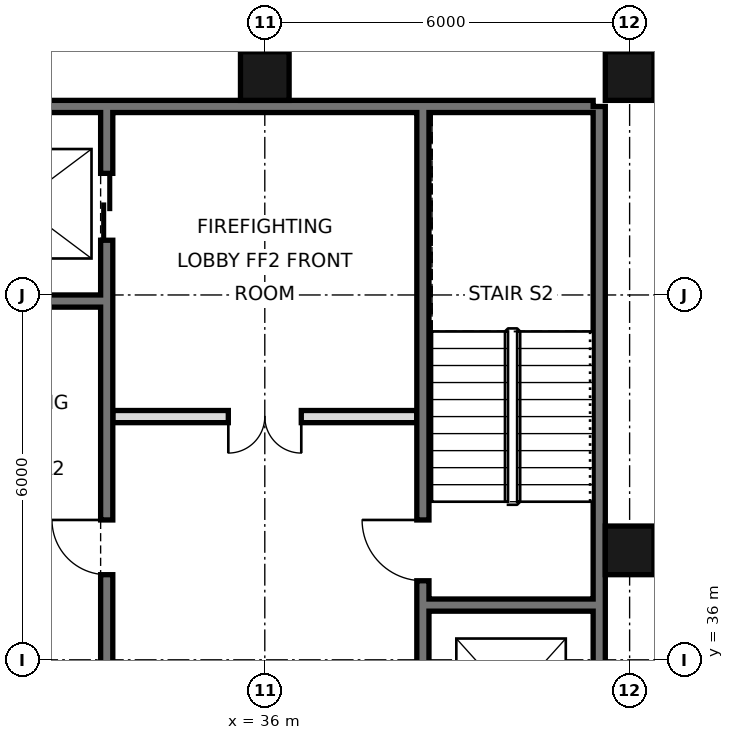
"""IFC4 building model, lengths in metres.
Left out: names, types, materials, properties, quantities, classifications, styles, units other than length and angle.
Written with IfcOpenShell. Run it as: python <this file> out.ifc"""

import sys

from ifc_helpers import new_model, si_unit, direction, frame, frame_2d, origin, origin_2d, place, context, subcontext, project, spatial, rectangle, hollow_rectangle, extrude, element, fill, save


model = new_model("IFC4")
c1 = context("Model", 3, precision=1e-05, world=origin(), true_north=direction((0.0, 1.0)))
c2 = subcontext(c1, "Body", "Model", "MODEL_VIEW")
j1 = project(units=[si_unit("LENGTHUNIT", "METRE"), si_unit("PLANEANGLEUNIT", "RADIAN")], contexts=[c1])
p1 = place(None, origin())
s1 = spatial("IfcSite", under=j1, at=p1, CompositionType="ELEMENT")
p2 = place(p1, origin())
s2 = spatial("IfcBuilding", under=s1, at=p2, CompositionType="ELEMENT")
p3 = place(p2, frame((0.0, 0.0, 273.8)))
s3 = spatial("IfcBuildingStorey", under=s2, at=p3, CompositionType="ELEMENT", Elevation=273.8)
for number, where, z_axis, x_axis in (
    (1, (36.0, 45.6, 0.0), (0.0, 0.0, 1.0), (1.0, 0.0, 0.0)),
    (2, (42.0, 37.8, 0.0), (0.0, 0.0, 1.0), (1.0, 0.0, 0.0)),
    (3, (42.0, 45.6, 0.0), (0.0, 0.0, 1.0), (1.0, 0.0, 0.0)),
):
    element("IfcColumn", number, at=place(p3, frame(where, z_axis=z_axis, x_axis=x_axis)), inside=s3, PredefinedType="COLUMN", context=c2, shape_type="SweptSolid", body=[
        extrude(hollow_rectangle(XDim=0.8, YDim=0.8, WallThickness=0.032, at=origin_2d()), origin(), (0.0, 0.0, 1.0), 3.6),
    ])
p4 = place(p3, frame((41.5, 21.6, 0.0), z_axis=(0.0, 0.0, 1.0), x_axis=(0.0, 1.0, 0.0)))
e4 = element("IfcWall", 4, at=p4, inside=s3, PredefinedType="SOLIDWALL", context=c2, shape_type="SweptSolid", body=[
    extrude(rectangle(XDim=23.5, YDim=0.2, at=frame_2d((11.75, 0.0))), origin(), (0.0, 0.0, 1.0), 3.42),
])
p5 = place(p3, frame((6.6, 45.1, 0.0), z_axis=(0.0, 0.0, 1.0), x_axis=(1.0, 0.0, 0.0)))
e5 = element("IfcWall", 5, at=p5, inside=s3, PredefinedType="SOLIDWALL", context=c2, shape_type="SweptSolid", body=[
    extrude(rectangle(XDim=34.8, YDim=0.2, at=frame_2d((17.4, 0.0))), origin(), (0.0, 0.0, 1.0), 3.42),
])
p6 = place(p3, frame((33.4, 27.5, 0.0), z_axis=(0.0, 0.0, 1.0), x_axis=(0.0, 1.0, 0.0)))
e6 = element("IfcWall", 6, at=p6, inside=s3, PredefinedType="SOLIDWALL", context=c2, shape_type="SweptSolid", body=[
    extrude(rectangle(XDim=17.5, YDim=0.2, at=frame_2d((8.75, 0.0))), origin(), (0.0, 0.0, 1.0), 3.42),
])
p7 = place(p6, frame((1.1, 0.0, 0.0)))
e7 = element("IfcOpeningElement", 7, at=p7, cuts=e6, PredefinedType="OPENING", context=c2, shape_type="SweptSolid", body=[
    extrude(rectangle(XDim=1.1, YDim=2.1, at=frame_2d((0.55, 1.05))), frame((0.0, 0.11, 0.0), z_axis=(0.0, -1.0, 0.0), x_axis=(1.0, 0.0, 0.0)), (0.0, 0.0, 1.0), 0.22),
])
p8 = place(p6, frame((4.2, 0.0, 0.0)))
e8 = element("IfcOpeningElement", 8, at=p8, cuts=e6, PredefinedType="OPENING", context=c2, shape_type="SweptSolid", body=[
    extrude(rectangle(XDim=1.1, YDim=2.1, at=frame_2d((0.55, 1.05))), frame((0.0, 0.11, 0.0), z_axis=(0.0, -1.0, 0.0), x_axis=(1.0, 0.0, 0.0)), (0.0, 0.0, 1.0), 0.22),
])
p9 = place(p6, frame((15.4, 0.0, 0.0)))
e9 = element("IfcOpeningElement", 9, at=p9, cuts=e6, PredefinedType="OPENING", context=c2, shape_type="SweptSolid", body=[
    extrude(rectangle(XDim=1.1, YDim=2.1, at=frame_2d((0.55, 1.05))), frame((0.0, 0.11, 0.0), z_axis=(0.0, -1.0, 0.0), x_axis=(1.0, 0.0, 0.0)), (0.0, 0.0, 1.0), 0.22),
])
p10 = place(p6, frame((9.9, 0.0, 0.0)))
e10 = element("IfcOpeningElement", 10, at=p10, cuts=e6, PredefinedType="OPENING", context=c2, shape_type="SweptSolid", body=[
    extrude(rectangle(XDim=0.9, YDim=2.1, at=frame_2d((0.45, 1.05))), frame((0.0, 0.11, 0.0), z_axis=(0.0, -1.0, 0.0), x_axis=(1.0, 0.0, 0.0)), (0.0, 0.0, 1.0), 0.22),
])
p11 = place(p3, frame((38.6, 21.6, 0.0), z_axis=(0.0, 0.0, 1.0), x_axis=(0.0, 1.0, 0.0)))
e11 = element("IfcWall", 11, at=p11, inside=s3, PredefinedType="SOLIDWALL", context=c2, shape_type="SweptSolid", body=[
    extrude(rectangle(XDim=23.4, YDim=0.2, at=frame_2d((11.7, 0.0))), origin(), (0.0, 0.0, 1.0), 3.42),
])
p12 = place(p11, frame((7.0, 0.0, 0.0)))
e12 = element("IfcOpeningElement", 12, at=p12, cuts=e11, PredefinedType="OPENING", context=c2, shape_type="SweptSolid", body=[
    extrude(rectangle(XDim=1.1, YDim=2.1, at=frame_2d((0.55, 1.05))), frame((0.0, 0.11, 0.0), z_axis=(0.0, -1.0, 0.0), x_axis=(1.0, 0.0, 0.0)), (0.0, 0.0, 1.0), 0.22),
])
p13 = place(p11, frame((10.1, 0.0, 0.0)))
e13 = element("IfcOpeningElement", 13, at=p13, cuts=e11, PredefinedType="OPENING", context=c2, shape_type="SweptSolid", body=[
    extrude(rectangle(XDim=1.1, YDim=2.1, at=frame_2d((0.55, 1.05))), frame((0.0, 0.11, 0.0), z_axis=(0.0, -1.0, 0.0), x_axis=(1.0, 0.0, 0.0)), (0.0, 0.0, 1.0), 0.22),
])
p14 = place(p11, frame((13.2, 0.0, 0.0)))
e14 = element("IfcOpeningElement", 14, at=p14, cuts=e11, PredefinedType="OPENING", context=c2, shape_type="SweptSolid", body=[
    extrude(rectangle(XDim=1.1, YDim=2.1, at=frame_2d((0.55, 1.05))), frame((0.0, 0.11, 0.0), z_axis=(0.0, -1.0, 0.0), x_axis=(1.0, 0.0, 0.0)), (0.0, 0.0, 1.0), 0.22),
])
p15 = place(p11, frame((15.7, 0.0, 0.0)))
e15 = element("IfcOpeningElement", 15, at=p15, cuts=e11, PredefinedType="OPENING", context=c2, shape_type="SweptSolid", body=[
    extrude(rectangle(XDim=1.0, YDim=2.1, at=frame_2d((0.5, 1.05))), frame((0.0, 0.11, 0.0), z_axis=(0.0, -1.0, 0.0), x_axis=(1.0, 0.0, 0.0)), (0.0, 0.0, 1.0), 0.22),
])
p16 = place(p11, frame((0.175, 0.0, 0.0)))
e16 = element("IfcOpeningElement", 16, at=p16, cuts=e11, PredefinedType="OPENING", context=c2, shape_type="SweptSolid", body=[
    extrude(rectangle(XDim=0.9, YDim=2.1, at=frame_2d((0.45, 1.05))), frame((0.0, 0.11, 0.0), z_axis=(0.0, -1.0, 0.0), x_axis=(1.0, 0.0, 0.0)), (0.0, 0.0, 1.0), 0.22),
])
p17 = place(p3, frame((38.7, 36.9, 0.0), z_axis=(0.0, 0.0, 1.0), x_axis=(1.0, 0.0, 0.0)))
e17 = element("IfcWall", 17, at=p17, inside=s3, PredefinedType="SOLIDWALL", context=c2, shape_type="SweptSolid", body=[
    extrude(rectangle(XDim=2.7, YDim=0.2, at=frame_2d((1.35, 0.0))), origin(), (0.0, 0.0, 1.0), 3.42),
])
p18 = place(p3, frame((33.5, 40.0, 0.0), z_axis=(0.0, 0.0, 1.0), x_axis=(1.0, 0.0, 0.0)))
e18 = element("IfcWall", 18, at=p18, inside=s3, PredefinedType="PARTITIONING", context=c2, shape_type="SweptSolid", body=[
    extrude(rectangle(XDim=5.0, YDim=0.2, at=frame_2d((2.5, 0.0))), origin(), (0.0, 0.0, 1.0), 3.42),
])
p19 = place(p18, frame((1.9, 0.0, 0.0)))
e19 = element("IfcOpeningElement", 19, at=p19, cuts=e18, PredefinedType="OPENING", context=c2, shape_type="SweptSolid", body=[
    extrude(rectangle(XDim=1.2, YDim=2.1, at=frame_2d((0.6, 1.05))), frame((0.0, 0.11, 0.0), z_axis=(0.0, -1.0, 0.0), x_axis=(1.0, 0.0, 0.0)), (0.0, 0.0, 1.0), 0.22),
])
p20 = place(p3, frame((30.6, 41.9, 0.0), z_axis=(0.0, 0.0, 1.0), x_axis=(1.0, 0.0, 0.0)))
e20 = element("IfcWall", 20, at=p20, inside=s3, PredefinedType="SOLIDWALL", context=c2, shape_type="SweptSolid", body=[
    extrude(rectangle(XDim=2.7, YDim=0.2, at=frame_2d((1.35, 0.0))), origin(), (0.0, 0.0, 1.0), 3.42),
])
p21 = place(p19, frame((1.2, 0.0, 0.0), z_axis=(0.0, 0.0, 1.0), x_axis=(-1.0, 0.0, 0.0)))
e21 = element("IfcDoor", 21, at=p21, inside=s3, OperationType="DOUBLE_DOOR_SINGLE_SWING", PredefinedType="DOOR", context=c2, shape_type="SweptSolid", body=[
    extrude(rectangle(XDim=1.2, YDim=2.1, at=frame_2d((0.6, 1.05))), frame((0.0, 0.025, 0.0), z_axis=(0.0, -1.0, 0.0), x_axis=(1.0, 0.0, 0.0)), (0.0, 0.0, 1.0), 0.05),
])
fill(e19, e21)
p22 = place(p9, origin())
e22 = element("IfcDoor", 22, at=p22, inside=s3, OperationType="DOUBLE_DOOR_SLIDING", PredefinedType="DOOR", context=c2, shape_type="SweptSolid", body=[
    extrude(rectangle(XDim=1.1, YDim=2.1, at=frame_2d((0.55, 1.05))), frame((0.0, 0.025, 0.0), z_axis=(0.0, -1.0, 0.0), x_axis=(1.0, 0.0, 0.0)), (0.0, 0.0, 1.0), 0.05),
])
fill(e9, e22)
p23 = place(p15, frame((1.0, 0.0, 0.0), z_axis=(0.0, 0.0, 1.0), x_axis=(-1.0, 0.0, 0.0)))
e23 = element("IfcDoor", 23, at=p23, inside=s3, OperationType="SINGLE_SWING_LEFT", PredefinedType="DOOR", context=c2, shape_type="SweptSolid", body=[
    extrude(rectangle(XDim=1.0, YDim=2.1, at=frame_2d((0.5, 1.05))), frame((0.0, 0.025, 0.0), z_axis=(0.0, -1.0, 0.0), x_axis=(1.0, 0.0, 0.0)), (0.0, 0.0, 1.0), 0.05),
])
fill(e15, e23)
p24 = place(p10, frame((0.9, 0.0, 0.0), z_axis=(0.0, 0.0, 1.0), x_axis=(-1.0, 0.0, 0.0)))
e24 = element("IfcDoor", 24, at=p24, inside=s3, OperationType="SINGLE_SWING_LEFT", PredefinedType="DOOR", context=c2, shape_type="SweptSolid", body=[
    extrude(rectangle(XDim=0.9, YDim=2.1, at=frame_2d((0.45, 1.05))), frame((0.0, 0.025, 0.0), z_axis=(0.0, -1.0, 0.0), x_axis=(1.0, 0.0, 0.0)), (0.0, 0.0, 1.0), 0.05),
])
fill(e10, e24)
save(model, sys.argv[1])
